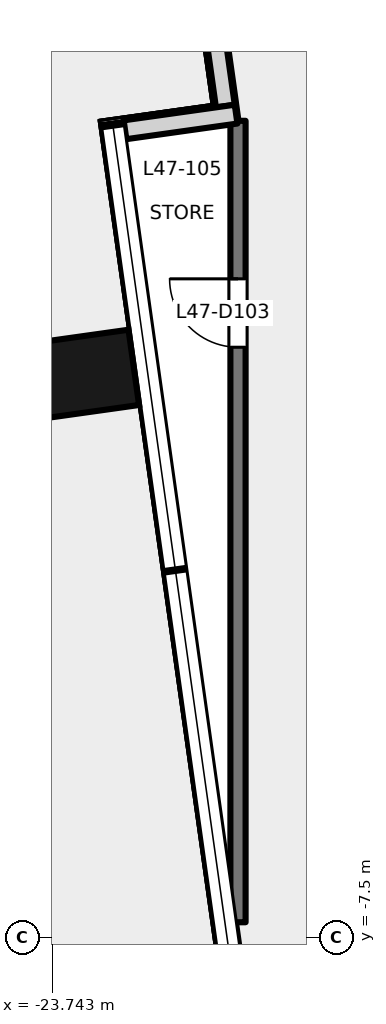
"""IFC4 building model, lengths in metres.
Left out: names, types, materials, properties, quantities, classifications, styles, units other than length and angle.
Written with IfcOpenShell. Run it as: python <this file> out.ifc"""

import sys

from ifc_helpers import new_model, si_unit, direction, frame, frame_2d, origin, origin_2d, place, context, subcontext, project, spatial, rectangle, extrude, element, fill, save


model = new_model("IFC4")
c1 = context("Model", 3, precision=1e-05, world=origin(), true_north=direction((0.0, 1.0)))
c2 = subcontext(c1, "Body", "Model", "MODEL_VIEW")
j1 = project(units=[si_unit("LENGTHUNIT", "METRE"), si_unit("PLANEANGLEUNIT", "RADIAN")], contexts=[c1])
p1 = place(None, origin())
s1 = spatial("IfcSite", under=j1, at=p1, CompositionType="ELEMENT")
p2 = place(p1, origin())
s2 = spatial("IfcBuilding", under=s1, at=p2, CompositionType="ELEMENT")
p3 = place(p2, frame((0.0, 0.0, 208.1)))
s3 = spatial("IfcBuildingStorey", under=s2, at=p3, CompositionType="ELEMENT", Elevation=208.1)
p4 = place(p3, frame((-23.561, -0.125, -0.2), z_axis=(0.0, 0.0, 1.0), x_axis=(-0.139190384377, 0.990265639562, 0.0)))
e1 = element("IfcColumn", 1, at=p4, inside=s3, PredefinedType="COLUMN", context=c2, shape_type="SweptSolid", body=[
    extrude(rectangle(XDim=1.0, YDim=1.8, at=origin_2d()), origin(), (0.0, 0.0, 1.0), 5.4),
])
p5 = place(p3, frame((-21.883, 6.409, 0.0), z_axis=(0.0, 0.0, 1.0), x_axis=(0.139324658755, -0.990246756855, 0.0)))
e2 = element("IfcWall", 2, at=p5, inside=s3, PredefinedType="SOLIDWALL", context=c2, shape_type="SweptSolid", body=[
    extrude(rectangle(XDim=3.0, YDim=0.25, at=frame_2d((1.5, 0.0))), origin(), (0.0, 0.0, 1.0), 5.2),
])
p6 = place(p3, frame((-21.324, 3.332, 0.0), z_axis=(0.0, 0.0, 1.0), x_axis=(-0.99024837765, -0.13931313851, 0.0)))
e3 = element("IfcWall", 3, at=p6, inside=s3, PredefinedType="SOLIDWALL", context=c2, shape_type="SweptSolid", body=[
    extrude(rectangle(XDim=1.476, YDim=0.25, at=frame_2d((0.738, 0.0))), origin(), (0.0, 0.0, 1.0), 5.2),
])
p7 = place(p3, frame((-21.299, -7.3, 0.0), z_axis=(0.0, 0.0, 1.0), x_axis=(0.0, 1.0, 0.0)))
e4 = element("IfcWall", 4, at=p7, inside=s3, PredefinedType="PARTITIONING", context=c2, shape_type="SweptSolid", body=[
    extrude(rectangle(XDim=10.544, YDim=0.2, at=frame_2d((5.272, 0.0))), origin(), (0.0, 0.0, 1.0), 4.9),
])
p8 = place(p7, frame((7.565, 0.0, 0.0)))
e5 = element("IfcOpeningElement", 5, at=p8, cuts=e4, PredefinedType="OPENING", context=c2, shape_type="SweptSolid", body=[
    extrude(rectangle(XDim=0.9, YDim=2.1, at=frame_2d((0.45, 1.05))), frame((0.0, 0.111, 0.0), z_axis=(0.0, -1.0, 0.0), x_axis=(1.0, 0.0, 0.0)), (0.0, 0.0, 1.0), 0.221),
])
p9 = place(p8, origin())
e6 = element("IfcDoor", 6, at=p9, inside=s3, OperationType="SINGLE_SWING_RIGHT", PredefinedType="DOOR", context=c2, shape_type="SweptSolid", body=[
    extrude(rectangle(XDim=0.9, YDim=2.1, at=frame_2d((0.45, 1.05))), frame((0.0, 0.025, 0.0), z_axis=(0.0, -1.0, 0.0), x_axis=(1.0, 0.0, 0.0)), (0.0, 0.0, 1.0), 0.05),
])
fill(e5, e6)
save(model, sys.argv[1])
